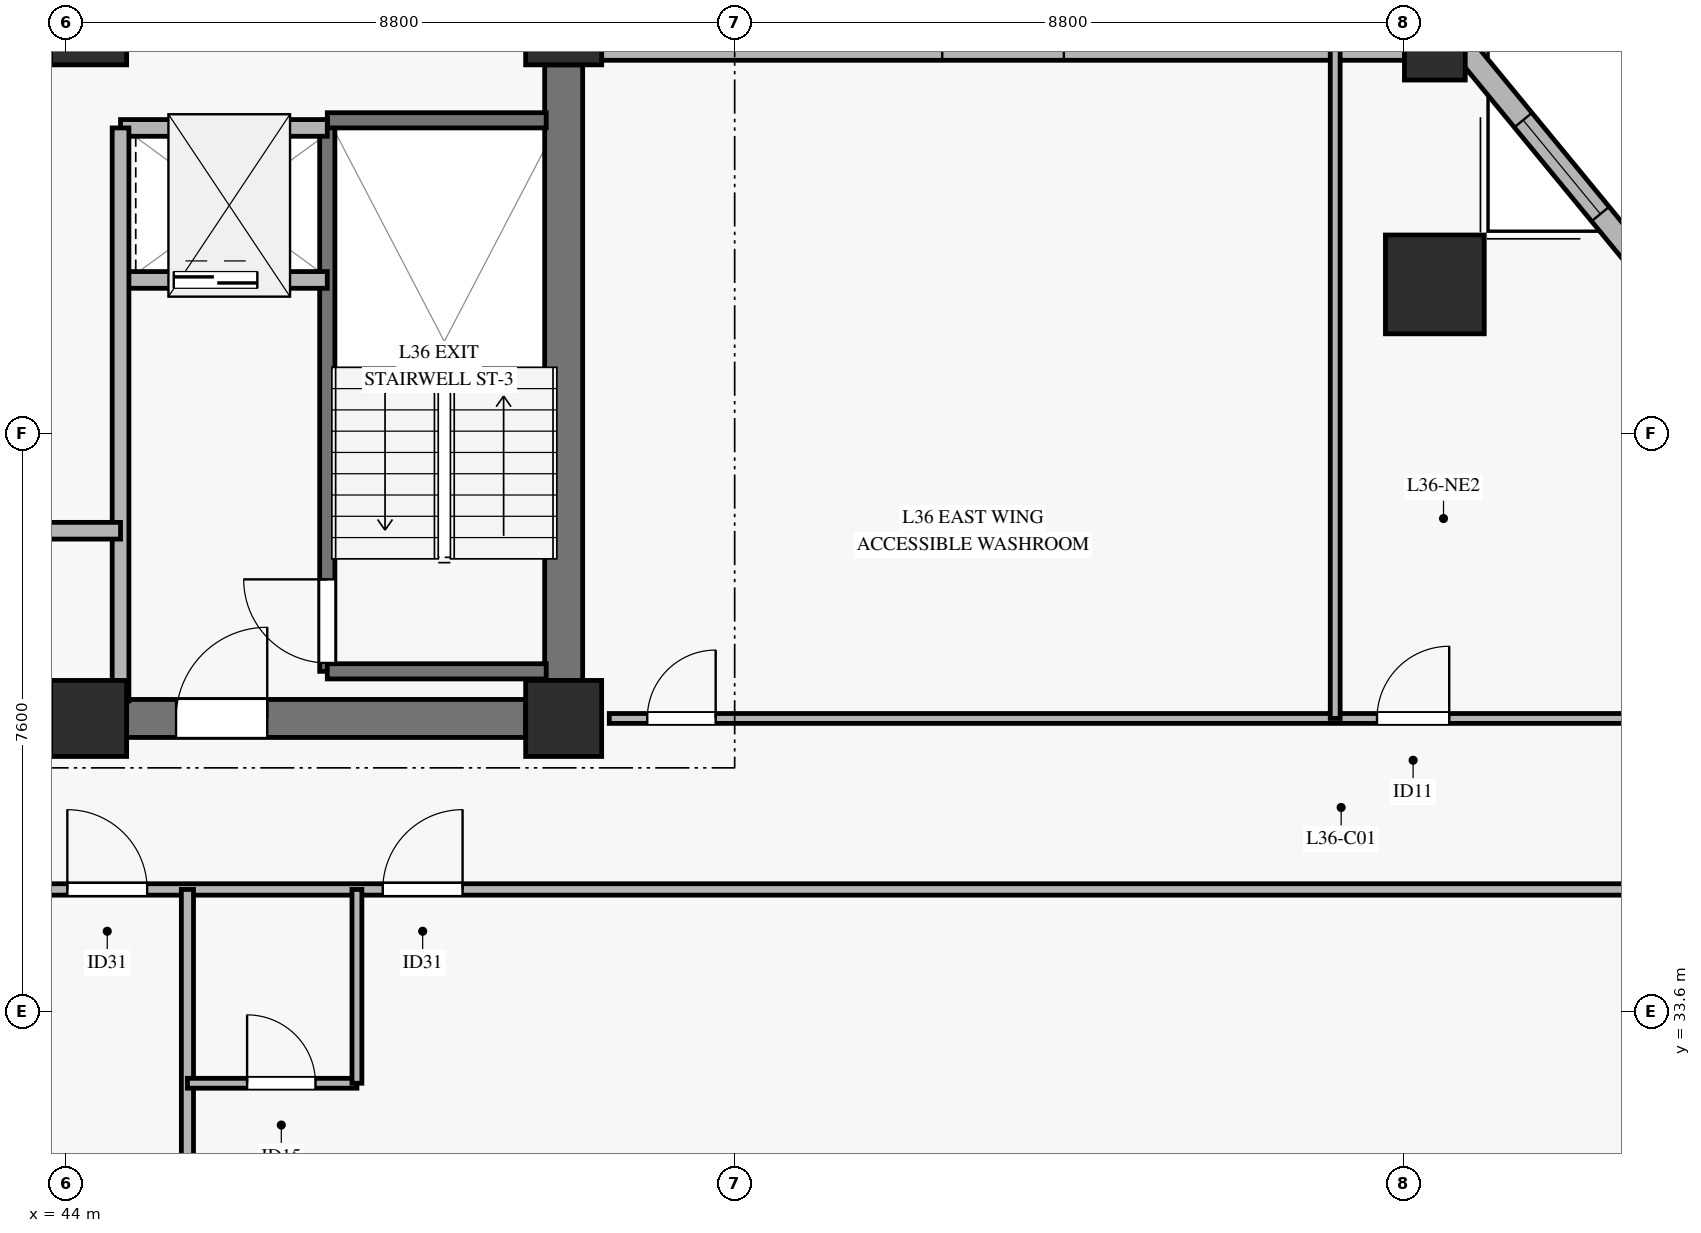
"""IFC4 building model, lengths in metres.
Left out: names, types, materials, properties, quantities, classifications, styles, units other than length and angle.
Written with IfcOpenShell. Run it as: python <this file> out.ifc"""

import sys

from ifc_helpers import new_model, si_unit, direction, frame, frame_2d, origin, origin_2d, place, context, subcontext, project, spatial, rectangle, hollow_rectangle, extrude, source, transform, mapped, element, fill, save


model = new_model("IFC4")
c1 = context("Model", 3, precision=1e-05, world=origin(), true_north=direction((0.0, 1.0)))
c2 = subcontext(c1, "Body", "Model", "MODEL_VIEW")
j1 = project(units=[si_unit("LENGTHUNIT", "METRE"), si_unit("PLANEANGLEUNIT", "RADIAN")], contexts=[c1])
p1 = place(None, origin())
s1 = spatial("IfcSite", under=j1, at=p1, CompositionType="ELEMENT")
p2 = place(p1, origin())
s2 = spatial("IfcBuilding", under=s1, at=p2, CompositionType="ELEMENT")
p3 = place(p2, frame((0.0, 0.0, 149.2)))
s3 = spatial("IfcBuildingStorey", under=s2, at=p3, CompositionType="ELEMENT", Elevation=149.2)
m1 = source(origin(), c2, "Body", "SweptSolid", [
    extrude(rectangle(XDim=1.0, YDim=1.0, at=origin_2d()), origin(), (0.0, 0.0, 1.0), 3.27),
])
for number, where, z_axis, x_axis in (
    (1, (44.3, 37.45, 0.0), (0.0, 0.0, 1.0), (1.0, 0.0, 0.0)),
    (2, (44.3, 46.55, 0.0), (0.0, 0.0, 1.0), (1.0, 0.0, 0.0)),
    (3, (50.55, 37.45, 0.0), (0.0, 0.0, 1.0), (1.0, 0.0, 0.0)),
    (4, (50.55, 46.55, 0.0), (0.0, 0.0, 1.0), (1.0, 0.0, 0.0)),
):
    element("IfcColumn", number, at=place(p3, frame(where, z_axis=z_axis, x_axis=x_axis)), inside=s3, PredefinedType="PILASTER", context=c2, shape_type="MappedRepresentation", body=[
        mapped(m1, transform((0.0, 0.0, 0.0), x_axis=(1.0, 0.0, 0.0), y_axis=(0.0, 1.0, 0.0), z_axis=(0.0, 0.0, 1.0), scale=1.0)),
    ])
p4 = place(p3, frame((44.8, 37.45, 0.0), z_axis=(0.0, 0.0, 1.0), x_axis=(1.0, 0.0, 0.0)))
e5 = element("IfcWall", 5, at=p4, inside=s3, PredefinedType="SHEAR", context=c2, shape_type="SweptSolid", body=[
    extrude(rectangle(XDim=5.25, YDim=0.5, at=frame_2d((2.625, 0.0))), origin(), (0.0, 0.0, 1.0), 3.27),
])
p5 = place(p4, frame((0.65, 0.0, 0.0)))
e6 = element("IfcOpeningElement", 6, at=p5, cuts=e5, PredefinedType="OPENING", context=c2, shape_type="SweptSolid", body=[
    extrude(rectangle(XDim=1.2, YDim=2.15, at=frame_2d((0.6, 1.075))), frame((0.0, 0.26, 0.0), z_axis=(0.0, -1.0, 0.0), x_axis=(1.0, 0.0, 0.0)), (0.0, 0.0, 1.0), 0.52),
])
p6 = place(p3, frame((50.55, 37.95, 0.0), z_axis=(0.0, 0.0, 1.0), x_axis=(0.0, 1.0, 0.0)))
e7 = element("IfcWall", 7, at=p6, inside=s3, PredefinedType="SHEAR", context=c2, shape_type="SweptSolid", body=[
    extrude(rectangle(XDim=8.1, YDim=0.5, at=frame_2d((4.05, 0.0))), origin(), (0.0, 0.0, 1.0), 3.27),
])
m2 = source(origin(), c2, "Body", "SweptSolid", [
    extrude(hollow_rectangle(XDim=1.3, YDim=1.3, WallThickness=0.06, at=origin_2d()), origin(), (0.0, 0.0, 1.0), 3.27),
])
p7 = place(p3, frame((62.012, 43.161, 0.0), z_axis=(0.0, 0.0, 1.0), x_axis=(1.0, 0.0, 0.0)))
e8 = element("IfcColumn", 8, at=p7, inside=s3, PredefinedType="COLUMN", context=c2, shape_type="MappedRepresentation", body=[
    mapped(m2, transform((0.0, 0.0, 0.0), x_axis=(1.0, 0.0, 0.0), y_axis=(0.0, 1.0, 0.0), z_axis=(0.0, 0.0, 1.0), scale=1.0)),
])
m3 = source(origin(), c2, "Body", "SweptSolid", [
    extrude(hollow_rectangle(XDim=0.8, YDim=0.8, WallThickness=0.036, at=origin_2d()), origin(), (0.0, 0.0, 1.0), 3.27),
])
p8 = place(p3, frame((62.012, 46.25, 0.0), z_axis=(0.0, 0.0, 1.0), x_axis=(1.0, 0.0, 0.0)))
e9 = element("IfcColumn", 9, at=p8, inside=s3, PredefinedType="COLUMN", context=c2, shape_type="MappedRepresentation", body=[
    mapped(m3, transform((0.0, 0.0, 0.0), x_axis=(1.0, 0.0, 0.0), y_axis=(0.0, 1.0, 0.0), z_axis=(0.0, 0.0, 1.0), scale=1.0)),
])
p9 = place(p3, frame((51.05, 46.25, 0.0), z_axis=(0.0, 0.0, 1.0), x_axis=(1.0, 0.0, 0.0)))
e10 = element("IfcWall", 10, at=p9, inside=s3, PredefinedType="SOLIDWALL", context=c2, shape_type="SweptSolid", body=[
    extrude(rectangle(XDim=10.562, YDim=0.28, at=frame_2d((5.281, 0.0))), origin(), (0.0, 0.0, 1.0), 2.75),
])
p10 = place(p9, frame((4.481, 0.0, 0.45)))
e11 = element("IfcOpeningElement", 11, at=p10, cuts=e10, PredefinedType="OPENING", context=c2, shape_type="SweptSolid", body=[
    extrude(rectangle(XDim=1.6, YDim=2.0, at=frame_2d((0.8, 1.0))), frame((0.0, 0.15, 0.0), z_axis=(0.0, -1.0, 0.0), x_axis=(1.0, 0.0, 0.0)), (0.0, 0.0, 1.0), 0.3),
])
p11 = place(p3, frame((64.951, 43.161, 0.0), z_axis=(0.0, 0.0, 1.0), x_axis=(-0.63493861858, 0.772562586873, 0.0)))
e12 = element("IfcWall", 12, at=p11, inside=s3, PredefinedType="SOLIDWALL", context=c2, shape_type="SweptSolid", body=[
    extrude(rectangle(XDim=3.999, YDim=0.3, at=frame_2d((1.999, 0.0))), origin(), (0.0, 0.0, 1.0), 2.75),
])
p12 = place(p11, frame((1.199, 0.0, 0.45)))
e13 = element("IfcOpeningElement", 13, at=p12, cuts=e12, PredefinedType="OPENING", context=c2, shape_type="SweptSolid", body=[
    extrude(rectangle(XDim=1.6, YDim=2.0, at=frame_2d((0.8, 1.0))), frame((0.0, 0.16, 0.0), z_axis=(0.0, -1.0, 0.0), x_axis=(1.0, 0.0, 0.0)), (0.0, 0.0, 1.0), 0.32),
])
p13 = place(p3, frame((47.44, 38.07, 0.0), z_axis=(0.0, 0.0, 1.0), x_axis=(0.0, 1.0, 0.0)))
e14 = element("IfcWall", 14, at=p13, inside=s3, PredefinedType="SOLIDWALL", context=c2, shape_type="SweptSolid", body=[
    extrude(rectangle(XDim=7.25, YDim=0.2, at=frame_2d((3.625, 0.0))), origin(), (0.0, 0.0, 1.0), 3.5),
])
p14 = place(p13, frame((0.11, 0.0, 0.0)))
e15 = element("IfcOpeningElement", 15, at=p14, cuts=e14, PredefinedType="OPENING", context=c2, shape_type="SweptSolid", body=[
    extrude(rectangle(XDim=1.1, YDim=2.15, at=frame_2d((0.55, 1.075))), frame((0.0, 0.11, 0.0), z_axis=(0.0, -1.0, 0.0), x_axis=(1.0, 0.0, 0.0)), (0.0, 0.0, 1.0), 0.22),
])
for number, where, z_axis, x_axis in (
    (16, (47.44, 45.32, 0.0), (0.0, 0.0, 1.0), (1.0, 0.0, 0.0)),
    (17, (47.44, 38.07, 0.0), (0.0, 0.0, 1.0), (1.0, 0.0, 0.0)),
):
    element("IfcWall", number, at=place(p3, frame(where, z_axis=z_axis, x_axis=x_axis)), inside=s3, PredefinedType="SOLIDWALL", context=c2, shape_type="SweptSolid", body=[
        extrude(rectangle(XDim=2.88, YDim=0.2, at=frame_2d((1.44, 0.0))), origin(), (0.0, 0.0, 1.0), 3.5),
    ])
p15 = place(p3, frame((44.72, 43.22, 0.0), z_axis=(0.0, 0.0, 1.0), x_axis=(1.0, 0.0, 0.0)))
e18 = element("IfcWall", 18, at=p15, inside=s3, PredefinedType="SOLIDWALL", context=c2, shape_type="SweptSolid", body=[
    extrude(rectangle(XDim=2.72, YDim=0.22, at=frame_2d((1.36, 0.0))), origin(), (0.0, 0.0, 1.0), 3.27),
])
p16 = place(p15, frame((0.7, 0.0, 0.0)))
e19 = element("IfcOpeningElement", 19, at=p16, cuts=e18, PredefinedType="OPENING", context=c2, shape_type="SweptSolid", body=[
    extrude(rectangle(XDim=1.1, YDim=2.2, at=frame_2d((0.55, 1.1))), frame((0.0, 0.12, 0.0), z_axis=(0.0, -1.0, 0.0), x_axis=(1.0, 0.0, 0.0)), (0.0, 0.0, 1.0), 0.24),
])
p17 = place(p3, frame((44.72, 45.22, 0.0), z_axis=(0.0, 0.0, 1.0), x_axis=(1.0, 0.0, 0.0)))
e20 = element("IfcWall", 20, at=p17, inside=s3, PredefinedType="SOLIDWALL", context=c2, shape_type="SweptSolid", body=[
    extrude(rectangle(XDim=2.72, YDim=0.22, at=frame_2d((1.36, 0.0))), origin(), (0.0, 0.0, 1.0), 3.27),
])
p18 = place(p3, frame((44.72, 37.68, 0.0), z_axis=(0.0, 0.0, 1.0), x_axis=(0.0, 1.0, 0.0)))
e21 = element("IfcWall", 21, at=p18, inside=s3, PredefinedType="SOLIDWALL", context=c2, shape_type="SweptSolid", body=[
    extrude(rectangle(XDim=7.54, YDim=0.22, at=frame_2d((3.77, 0.0))), origin(), (0.0, 0.0, 1.0), 3.27),
])
p19 = place(p3, frame((36.12, 39.92, 0.0), z_axis=(0.0, 0.0, 1.0), x_axis=(1.0, 0.0, 0.0)))
e22 = element("IfcWall", 22, at=p19, inside=s3, PredefinedType="SOLIDWALL", context=c2, shape_type="SweptSolid", body=[
    extrude(rectangle(XDim=8.6, YDim=0.22, at=frame_2d((4.3, 0.0))), origin(), (0.0, 0.0, 1.0), 2.555),
])
p20 = place(p3, frame((5.449, 35.2, 0.0), z_axis=(0.0, 0.0, 1.0), x_axis=(1.0, 0.0, 0.0)))
e23 = element("IfcWall", 23, at=p20, inside=s3, PredefinedType="PARTITIONING", context=c2, shape_type="SweptSolid", body=[
    extrude(rectangle(XDim=59.502, YDim=0.15, at=frame_2d((29.751, 0.0))), origin(), (0.0, 0.0, 1.0), 2.455),
])
p21 = place(p20, frame((2.77, 0.0, 0.0)))
e24 = element("IfcOpeningElement", 24, at=p21, cuts=e23, PredefinedType="OPENING", context=c2, shape_type="SweptSolid", body=[
    extrude(rectangle(XDim=1.05, YDim=2.15, at=frame_2d((0.525, 1.075))), frame((0.0, 0.085, 0.0), z_axis=(0.0, -1.0, 0.0), x_axis=(1.0, 0.0, 0.0)), (0.0, 0.0, 1.0), 0.17),
])
p22 = place(p20, frame((18.921, 0.0, 0.0)))
e25 = element("IfcOpeningElement", 25, at=p22, cuts=e23, PredefinedType="OPENING", context=c2, shape_type="SweptSolid", body=[
    extrude(rectangle(XDim=1.05, YDim=2.15, at=frame_2d((0.525, 1.075))), frame((0.0, 0.085, 0.0), z_axis=(0.0, -1.0, 0.0), x_axis=(1.0, 0.0, 0.0)), (0.0, 0.0, 1.0), 0.17),
])
p23 = place(p20, frame((24.427, 0.0, 0.0)))
e26 = element("IfcOpeningElement", 26, at=p23, cuts=e23, PredefinedType="OPENING", context=c2, shape_type="SweptSolid", body=[
    extrude(rectangle(XDim=1.05, YDim=2.15, at=frame_2d((0.525, 1.075))), frame((0.0, 0.085, 0.0), z_axis=(0.0, -1.0, 0.0), x_axis=(1.0, 0.0, 0.0)), (0.0, 0.0, 1.0), 0.17),
])
p24 = place(p20, frame((29.227, 0.0, 0.0)))
e27 = element("IfcOpeningElement", 27, at=p24, cuts=e23, PredefinedType="OPENING", context=c2, shape_type="SweptSolid", body=[
    extrude(rectangle(XDim=1.05, YDim=2.15, at=frame_2d((0.525, 1.075))), frame((0.0, 0.085, 0.0), z_axis=(0.0, -1.0, 0.0), x_axis=(1.0, 0.0, 0.0)), (0.0, 0.0, 1.0), 0.17),
])
p25 = place(p20, frame((34.027, 0.0, 0.0)))
e28 = element("IfcOpeningElement", 28, at=p25, cuts=e23, PredefinedType="OPENING", context=c2, shape_type="SweptSolid", body=[
    extrude(rectangle(XDim=1.05, YDim=2.15, at=frame_2d((0.525, 1.075))), frame((0.0, 0.085, 0.0), z_axis=(0.0, -1.0, 0.0), x_axis=(1.0, 0.0, 0.0)), (0.0, 0.0, 1.0), 0.17),
])
p26 = place(p20, frame((38.571, 0.0, 0.0)))
e29 = element("IfcOpeningElement", 29, at=p26, cuts=e23, PredefinedType="OPENING", context=c2, shape_type="SweptSolid", body=[
    extrude(rectangle(XDim=1.05, YDim=2.15, at=frame_2d((0.525, 1.075))), frame((0.0, 0.085, 0.0), z_axis=(0.0, -1.0, 0.0), x_axis=(1.0, 0.0, 0.0)), (0.0, 0.0, 1.0), 0.17),
])
p27 = place(p20, frame((42.721, 0.0, 0.0)))
e30 = element("IfcOpeningElement", 30, at=p27, cuts=e23, PredefinedType="OPENING", context=c2, shape_type="SweptSolid", body=[
    extrude(rectangle(XDim=1.05, YDim=2.15, at=frame_2d((0.525, 1.075))), frame((0.0, 0.085, 0.0), z_axis=(0.0, -1.0, 0.0), x_axis=(1.0, 0.0, 0.0)), (0.0, 0.0, 1.0), 0.17),
])
p28 = place(p3, frame((45.6, 8.572, 0.0), z_axis=(0.0, 0.0, 1.0), x_axis=(0.0, 1.0, 0.0)))
e31 = element("IfcWall", 31, at=p28, inside=s3, PredefinedType="PARTITIONING", context=c2, shape_type="SweptSolid", body=[
    extrude(rectangle(XDim=26.628, YDim=0.16, at=frame_2d((13.314, 0.0))), origin(), (0.0, 0.0, 1.0), 2.755),
])
p29 = place(p3, frame((45.6, 32.65, 0.0), z_axis=(0.0, 0.0, 1.0), x_axis=(1.0, 0.0, 0.0)))
e32 = element("IfcWall", 32, at=p29, inside=s3, PredefinedType="PARTITIONING", context=c2, shape_type="SweptSolid", body=[
    extrude(rectangle(XDim=2.23, YDim=0.13, at=frame_2d((1.115, 0.0))), origin(), (0.0, 0.0, 1.0), 2.805),
])
p30 = place(p29, frame((0.785, 0.0, 0.0)))
e33 = element("IfcOpeningElement", 33, at=p30, cuts=e32, PredefinedType="OPENING", context=c2, shape_type="SweptSolid", body=[
    extrude(rectangle(XDim=0.9, YDim=2.1, at=frame_2d((0.45, 1.05))), frame((0.0, 0.075, 0.0), z_axis=(0.0, -1.0, 0.0), x_axis=(1.0, 0.0, 0.0)), (0.0, 0.0, 1.0), 0.15),
])
p31 = place(p3, frame((47.83, 32.65, 0.0), z_axis=(0.0, 0.0, 1.0), x_axis=(0.0, 1.0, 0.0)))
e34 = element("IfcWall", 34, at=p31, inside=s3, PredefinedType="PARTITIONING", context=c2, shape_type="SweptSolid", body=[
    extrude(rectangle(XDim=2.55, YDim=0.13, at=frame_2d((1.275, 0.0))), origin(), (0.0, 0.0, 1.0), 2.805),
])
p32 = place(p3, frame((51.15, 37.45, 0.0), z_axis=(0.0, 0.0, 1.0), x_axis=(1.0, 0.0, 0.0)))
e35 = element("IfcWall", 35, at=p32, inside=s3, PredefinedType="PARTITIONING", context=c2, shape_type="SweptSolid", body=[
    extrude(rectangle(XDim=13.801, YDim=0.13, at=frame_2d((6.9, 0.0))), origin(), (0.0, 0.0, 1.0), 2.755),
])
p33 = place(p32, frame((0.5, 0.0, 0.0)))
e36 = element("IfcOpeningElement", 36, at=p33, cuts=e35, PredefinedType="OPENING", context=c2, shape_type="SweptSolid", body=[
    extrude(rectangle(XDim=0.9, YDim=2.1, at=frame_2d((0.45, 1.05))), frame((0.0, 0.075, 0.0), z_axis=(0.0, -1.0, 0.0), x_axis=(1.0, 0.0, 0.0)), (0.0, 0.0, 1.0), 0.15),
])
p34 = place(p32, frame((10.101, 0.0, 0.0)))
e37 = element("IfcOpeningElement", 37, at=p34, cuts=e35, PredefinedType="OPENING", context=c2, shape_type="SweptSolid", body=[
    extrude(rectangle(XDim=0.95, YDim=2.1, at=frame_2d((0.475, 1.05))), frame((0.0, 0.075, 0.0), z_axis=(0.0, -1.0, 0.0), x_axis=(1.0, 0.0, 0.0)), (0.0, 0.0, 1.0), 0.15),
])
p35 = place(p3, frame((60.701, 37.45, 0.0), z_axis=(0.0, 0.0, 1.0), x_axis=(0.0, 1.0, 0.0)))
e38 = element("IfcWall", 38, at=p35, inside=s3, PredefinedType="PARTITIONING", context=c2, shape_type="SweptSolid", body=[
    extrude(rectangle(XDim=8.8, YDim=0.13, at=frame_2d((4.4, 0.0))), origin(), (0.0, 0.0, 1.0), 3.27),
])
m4 = source(origin(), c2, "Body", "SweptSolid", [
    extrude(rectangle(XDim=1.6, YDim=2.0, at=frame_2d((0.8, 1.0))), frame((0.0, 0.03, 0.0), z_axis=(0.0, -1.0, 0.0), x_axis=(1.0, 0.0, 0.0)), (0.0, 0.0, 1.0), 0.06),
])
p36 = place(p12, origin())
e39 = element("IfcWindow", 39, at=p36, inside=s3, PartitioningType="SINGLE_PANEL", PredefinedType="WINDOW", context=c2, shape_type="MappedRepresentation", body=[
    mapped(m4, transform((0.0, 0.0, 0.0), x_axis=(1.0, 0.0, 0.0), y_axis=(0.0, 1.0, 0.0), z_axis=(0.0, 0.0, 1.0), scale=1.0)),
])
fill(e13, e39)
m5 = source(origin(), c2, "Body", "SweptSolid", [
    extrude(rectangle(XDim=1.1, YDim=2.15, at=frame_2d((0.55, 1.075))), frame((0.0, 0.025, 0.0), z_axis=(0.0, -1.0, 0.0), x_axis=(1.0, 0.0, 0.0)), (0.0, 0.0, 1.0), 0.05),
])
p37 = place(p14, origin())
e40 = element("IfcDoor", 40, at=p37, inside=s3, OperationType="SINGLE_SWING_RIGHT", PredefinedType="DOOR", context=c2, shape_type="MappedRepresentation", body=[
    mapped(m5, transform((0.0, 0.0, 0.0), x_axis=(1.0, 0.0, 0.0), y_axis=(0.0, 1.0, 0.0), z_axis=(0.0, 0.0, 1.0), scale=1.0)),
])
fill(e15, e40)
m6 = source(origin(), c2, "Body", "SweptSolid", [
    extrude(rectangle(XDim=1.1, YDim=2.2, at=frame_2d((0.55, 1.1))), frame((0.0, 0.025, 0.0), z_axis=(0.0, -1.0, 0.0), x_axis=(1.0, 0.0, 0.0)), (0.0, 0.0, 1.0), 0.05),
])
p38 = place(p16, origin())
e41 = element("IfcDoor", 41, at=p38, inside=s3, OperationType="SLIDING_TO_LEFT", PredefinedType="DOOR", context=c2, shape_type="MappedRepresentation", body=[
    mapped(m6, transform((0.0, 0.0, 0.0), x_axis=(1.0, 0.0, 0.0), y_axis=(0.0, 1.0, 0.0), z_axis=(0.0, 0.0, 1.0), scale=1.0)),
])
fill(e19, e41)
m7 = source(origin(), c2, "Body", "SweptSolid", [
    extrude(rectangle(XDim=1.2, YDim=2.15, at=frame_2d((0.6, 1.075))), frame((0.0, 0.025, 0.0), z_axis=(0.0, -1.0, 0.0), x_axis=(1.0, 0.0, 0.0)), (0.0, 0.0, 1.0), 0.05),
])
p39 = place(p5, origin())
e42 = element("IfcDoor", 42, at=p39, inside=s3, OperationType="SINGLE_SWING_RIGHT", PredefinedType="DOOR", context=c2, shape_type="MappedRepresentation", body=[
    mapped(m7, transform((0.0, 0.0, 0.0), x_axis=(1.0, 0.0, 0.0), y_axis=(0.0, 1.0, 0.0), z_axis=(0.0, 0.0, 1.0), scale=1.0)),
])
fill(e6, e42)
m8 = source(origin(), c2, "Body", "SweptSolid", [
    extrude(rectangle(XDim=1.05, YDim=2.15, at=frame_2d((0.525, 1.075))), frame((0.0, 0.025, 0.0), z_axis=(0.0, -1.0, 0.0), x_axis=(1.0, 0.0, 0.0)), (0.0, 0.0, 1.0), 0.05),
])
p40 = place(p26, origin())
e43 = element("IfcDoor", 43, at=p40, inside=s3, OperationType="SINGLE_SWING_LEFT", PredefinedType="DOOR", context=c2, shape_type="MappedRepresentation", body=[
    mapped(m8, transform((0.0, 0.0, 0.0), x_axis=(1.0, 0.0, 0.0), y_axis=(0.0, 1.0, 0.0), z_axis=(0.0, 0.0, 1.0), scale=1.0)),
])
fill(e29, e43)
p41 = place(p27, origin())
e44 = element("IfcDoor", 44, at=p41, inside=s3, OperationType="SINGLE_SWING_RIGHT", PredefinedType="DOOR", context=c2, shape_type="MappedRepresentation", body=[
    mapped(m8, transform((0.0, 0.0, 0.0), x_axis=(1.0, 0.0, 0.0), y_axis=(0.0, 1.0, 0.0), z_axis=(0.0, 0.0, 1.0), scale=1.0)),
])
fill(e30, e44)
m9 = source(origin(), c2, "Body", "SweptSolid", [
    extrude(rectangle(XDim=0.9, YDim=2.1, at=frame_2d((0.45, 1.05))), frame((0.0, 0.025, 0.0), z_axis=(0.0, -1.0, 0.0), x_axis=(1.0, 0.0, 0.0)), (0.0, 0.0, 1.0), 0.05),
])
p42 = place(p30, origin())
e45 = element("IfcDoor", 45, at=p42, inside=s3, OperationType="SINGLE_SWING_LEFT", PredefinedType="DOOR", context=c2, shape_type="MappedRepresentation", body=[
    mapped(m9, transform((0.0, 0.0, 0.0), x_axis=(1.0, 0.0, 0.0), y_axis=(0.0, 1.0, 0.0), z_axis=(0.0, 0.0, 1.0), scale=1.0)),
])
fill(e33, e45)
p43 = place(p33, origin())
e46 = element("IfcDoor", 46, at=p43, inside=s3, OperationType="SINGLE_SWING_RIGHT", PredefinedType="DOOR", context=c2, shape_type="MappedRepresentation", body=[
    mapped(m9, transform((0.0, 0.0, 0.0), x_axis=(1.0, 0.0, 0.0), y_axis=(0.0, 1.0, 0.0), z_axis=(0.0, 0.0, 1.0), scale=1.0)),
])
fill(e36, e46)
m10 = source(origin(), c2, "Body", "SweptSolid", [
    extrude(rectangle(XDim=0.95, YDim=2.1, at=frame_2d((0.475, 1.05))), frame((0.0, 0.025, 0.0), z_axis=(0.0, -1.0, 0.0), x_axis=(1.0, 0.0, 0.0)), (0.0, 0.0, 1.0), 0.05),
])
p44 = place(p34, origin())
e47 = element("IfcDoor", 47, at=p44, inside=s3, OperationType="SINGLE_SWING_RIGHT", PredefinedType="DOOR", context=c2, shape_type="MappedRepresentation", body=[
    mapped(m10, transform((0.0, 0.0, 0.0), x_axis=(1.0, 0.0, 0.0), y_axis=(0.0, 1.0, 0.0), z_axis=(0.0, 0.0, 1.0), scale=1.0)),
])
fill(e37, e47)
save(model, sys.argv[1])
